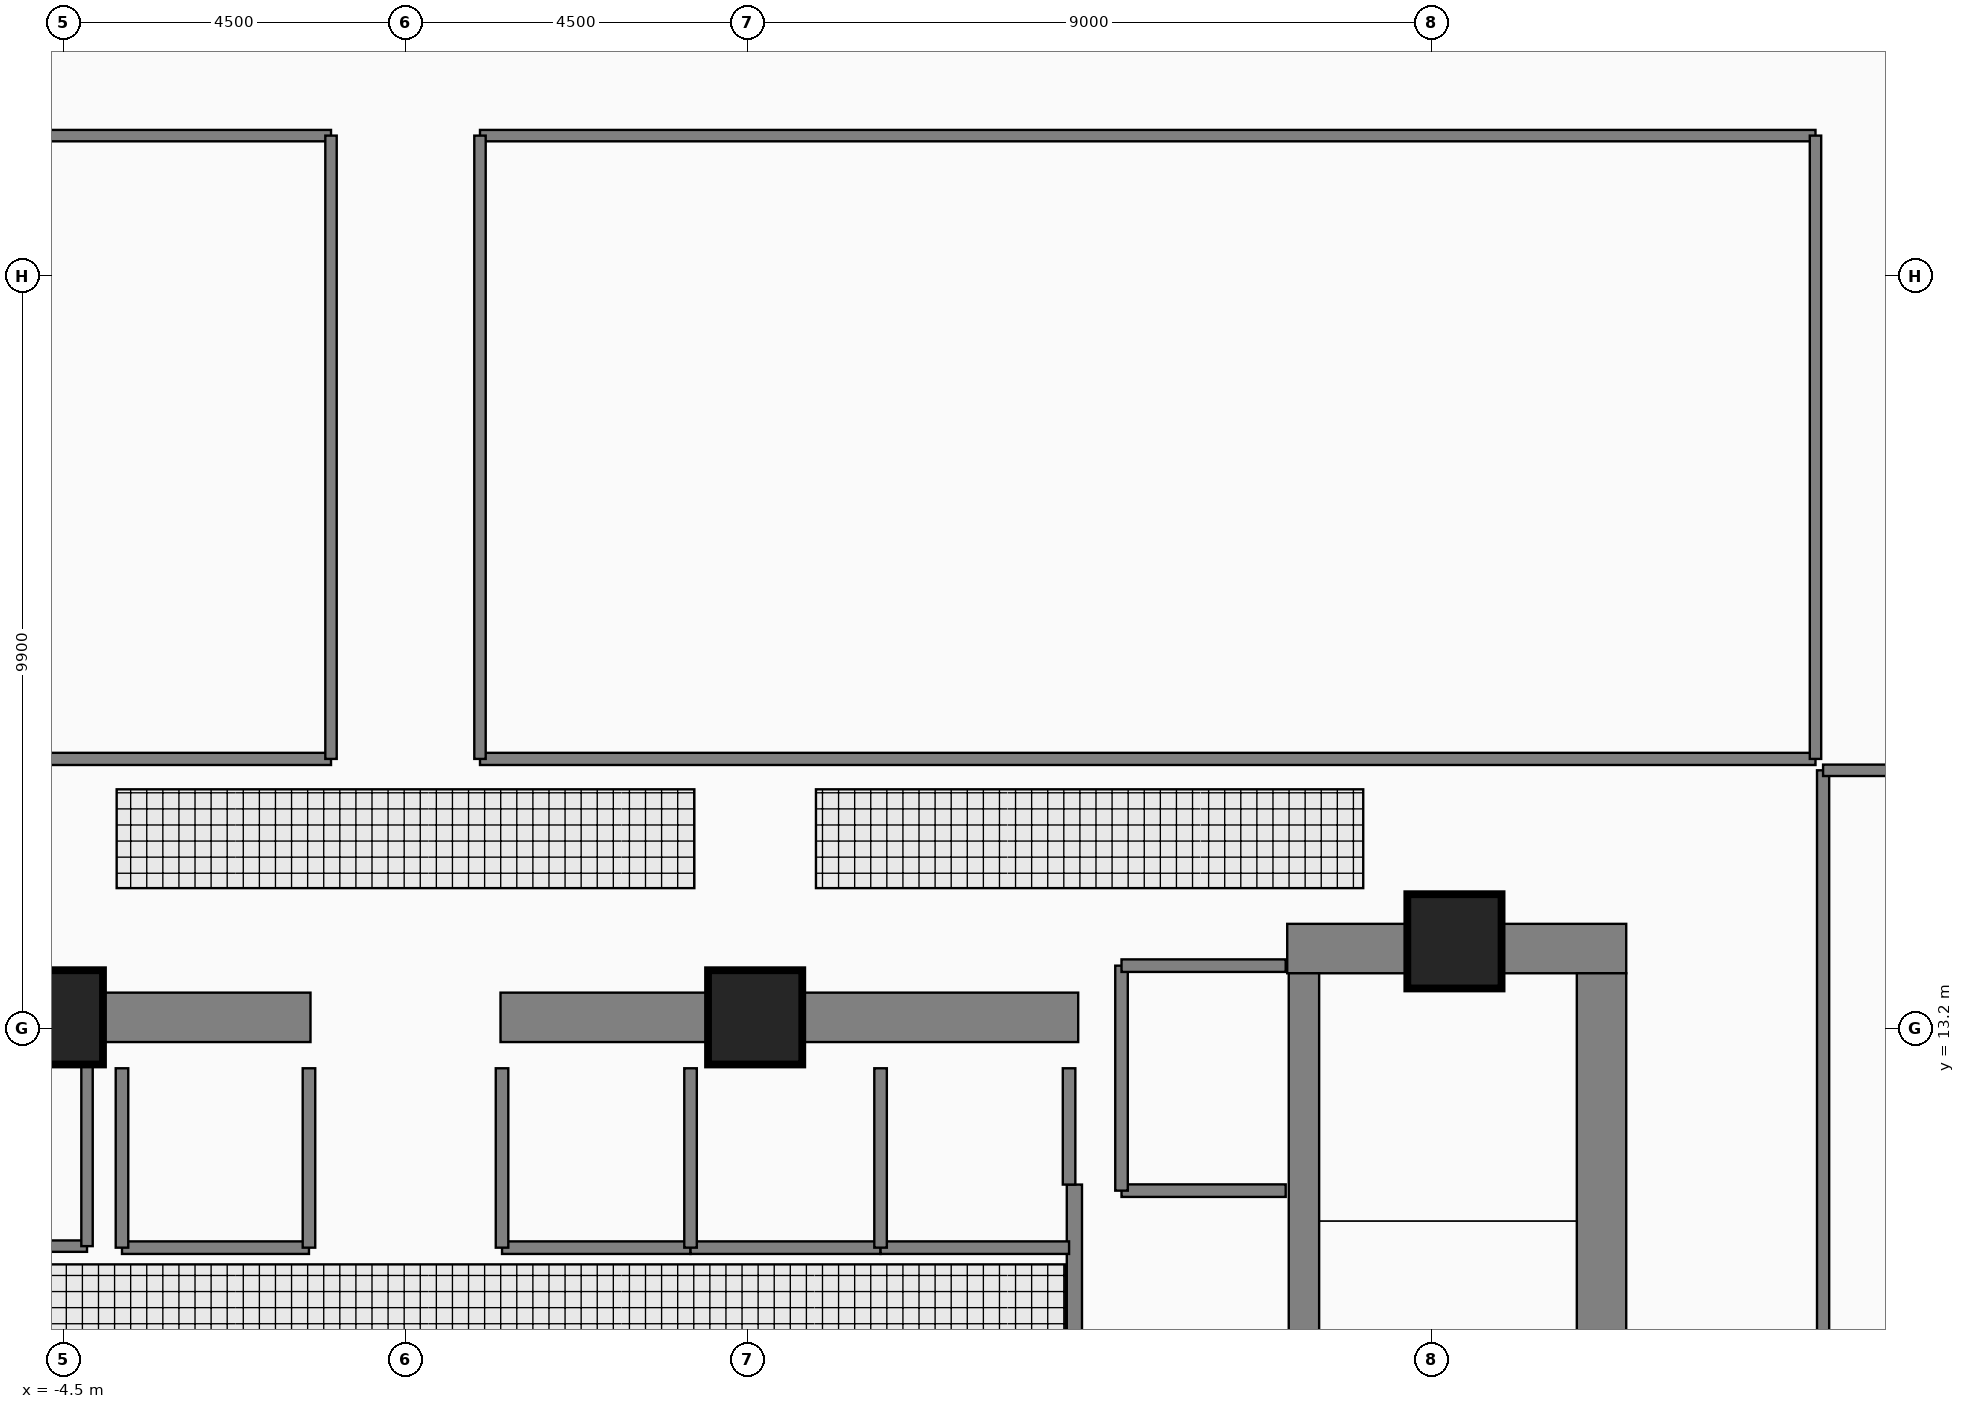
"""IFC4 building model, lengths in metres.
Left out: names, types, materials, properties, quantities, classifications, styles, units other than length and angle.
Written with IfcOpenShell. Run it as: python <this file> out.ifc"""

import sys

from ifc_helpers import new_model, si_unit, direction, frame, frame_2d, origin, origin_2d, place, context, subcontext, project, spatial, rectangle, extrude, element, fill, save


model = new_model("IFC4")
c1 = context("Model", 3, precision=1e-05, world=origin(), true_north=direction((0.0, 1.0)))
c2 = subcontext(c1, "Body", "Model", "MODEL_VIEW")
j1 = project(units=[si_unit("LENGTHUNIT", "METRE"), si_unit("PLANEANGLEUNIT", "RADIAN")], contexts=[c1])
p1 = place(None, origin())
s1 = spatial("IfcSite", under=j1, at=p1, CompositionType="ELEMENT")
p2 = place(p1, origin())
s2 = spatial("IfcBuilding", under=s1, at=p2, CompositionType="ELEMENT")
p3 = place(p2, frame((0.0, 0.0, 168.2)))
s3 = spatial("IfcBuildingStorey", under=s2, at=p3, CompositionType="ELEMENT", Elevation=168.2)
p4 = place(p3, frame((11.6, 14.255, 0.0), z_axis=(0.0, 0.0, 1.0), x_axis=(1.0, 0.0, 0.0)))
e1 = element("IfcWall", 1, at=p4, inside=s3, PredefinedType="SHEAR", context=c2, shape_type="SweptSolid", body=[
    extrude(rectangle(XDim=4.46, YDim=0.65, at=frame_2d((2.23, 0.0))), origin(), (0.0, 0.0, 1.0), 4.41),
])
p5 = place(p3, frame((15.735, 4.97, 0.0), z_axis=(0.0, 0.0, 1.0), x_axis=(0.0, 1.0, 0.0)))
e2 = element("IfcWall", 2, at=p5, inside=s3, PredefinedType="SHEAR", context=c2, shape_type="SweptSolid", body=[
    extrude(rectangle(XDim=8.96, YDim=0.65, at=frame_2d((4.48, 0.0))), origin(), (0.0, 0.0, 1.0), 4.41),
])
for number, where, z_axis, x_axis in (
    (3, (-8.85, 13.35, 0.0), (0.0, 0.0, 1.0), (1.0, 0.0, 0.0)),
    (4, (1.25, 13.35, 0.0), (0.0, 0.0, 1.0), (1.0, 0.0, 0.0)),
):
    element("IfcWall", number, at=place(p3, frame(where, z_axis=z_axis, x_axis=x_axis)), inside=s3, PredefinedType="SHEAR", context=c2, shape_type="SweptSolid", body=[
        extrude(rectangle(XDim=7.6, YDim=0.65, at=frame_2d((3.8, 0.0))), origin(), (0.0, 0.0, 1.0), 4.38),
    ])
p6 = place(p3, frame((11.82, 13.93, 0.0), z_axis=(0.0, 0.0, 1.0), x_axis=(0.0, -1.0, 0.0)))
e5 = element("IfcWall", 5, at=p6, inside=s3, PredefinedType="SHEAR", context=c2, shape_type="SweptSolid", body=[
    extrude(rectangle(XDim=8.96, YDim=0.4, at=frame_2d((4.48, 0.0))), origin(), (0.0, 0.0, 1.0), 4.41),
])
p7 = place(p6, frame((7.53, 0.0, 0.0)))
e6 = element("IfcOpeningElement", 6, at=p7, cuts=e5, PredefinedType="OPENING", context=c2, shape_type="SweptSolid", body=[
    extrude(rectangle(XDim=1.12, YDim=2.22, at=frame_2d((0.56, 1.11))), frame((0.0, 0.21, 0.0), z_axis=(0.0, -1.0, 0.0), x_axis=(1.0, 0.0, 0.0)), (0.0, 0.0, 1.0), 0.42),
])
for number, where, z_axis, x_axis in (
    (7, (-4.6, 13.35, 0.0), (0.0, 0.0, 1.0), (1.0, 0.0, 0.0)),
    (8, (4.6, 13.35, 0.0), (0.0, 0.0, 1.0), (1.0, 0.0, 0.0)),
    (9, (13.8, 14.35, 0.0), (0.0, 0.0, 1.0), (1.0, 0.0, 0.0)),
):
    element("IfcColumn", number, at=place(p3, frame(where, z_axis=z_axis, x_axis=x_axis)), inside=s3, PredefinedType="COLUMN", context=c2, shape_type="SweptSolid", body=[
        extrude(rectangle(XDim=1.2, YDim=1.2, at=origin_2d()), origin(), (0.0, 0.0, 1.0), 4.6),
    ])
p8 = place(p3, frame((8.8, 11.15, 0.0), z_axis=(0.0, 0.0, 1.0), x_axis=(0.0, -1.0, 0.0)))
e10 = element("IfcWall", 10, at=p8, inside=s3, PredefinedType="PARTITIONING", context=c2, shape_type="SweptSolid", body=[
    extrude(rectangle(XDim=6.1, YDim=0.2, at=frame_2d((3.05, 0.0))), origin(), (0.0, 0.0, 1.0), 4.38),
])
p9 = place(p8, frame((1.15, 0.0, 0.0)))
e11 = element("IfcOpeningElement", 11, at=p9, cuts=e10, PredefinedType="OPENING", context=c2, shape_type="SweptSolid", body=[
    extrude(rectangle(XDim=1.1, YDim=2.2, at=frame_2d((0.55, 1.1))), frame((0.0, 0.11, 0.0), z_axis=(0.0, -1.0, 0.0), x_axis=(1.0, 0.0, 0.0)), (0.0, 0.0, 1.0), 0.22),
])
p10 = place(p8, frame((4.75, 0.0, 0.0)))
e12 = element("IfcOpeningElement", 12, at=p10, cuts=e10, PredefinedType="OPENING", context=c2, shape_type="SweptSolid", body=[
    extrude(rectangle(XDim=1.1, YDim=2.2, at=frame_2d((0.55, 1.1))), frame((0.0, 0.11, 0.0), z_axis=(0.0, -1.0, 0.0), x_axis=(1.0, 0.0, 0.0)), (0.0, 0.0, 1.0), 0.22),
])
p11 = place(p3, frame((9.42, 11.07, 0.0), z_axis=(0.0, 0.0, 1.0), x_axis=(1.0, 0.0, 0.0)))
e13 = element("IfcWall", 13, at=p11, inside=s3, PredefinedType="PARTITIONING", context=c2, shape_type="SweptSolid", body=[
    extrude(rectangle(XDim=2.16, YDim=0.165, at=frame_2d((1.08, 0.0))), origin(), (0.0, 0.0, 1.0), 4.38),
])
p12 = place(p11, frame((0.53, 0.0, 0.0)))
e14 = element("IfcOpeningElement", 14, at=p12, cuts=e13, PredefinedType="OPENING", context=c2, shape_type="SweptSolid", body=[
    extrude(rectangle(XDim=1.15, YDim=2.25, at=frame_2d((0.575, 1.125))), frame((0.0, 0.093, 0.0), z_axis=(0.0, -1.0, 0.0), x_axis=(1.0, 0.0, 0.0)), (0.0, 0.0, 1.0), 0.185),
])
p13 = place(p3, frame((-3.73, 10.32, 0.0), z_axis=(0.0, 0.0, 1.0), x_axis=(1.0, 0.0, 0.0)))
e15 = element("IfcWall", 15, at=p13, inside=s3, PredefinedType="PARTITIONING", context=c2, shape_type="SweptSolid", body=[
    extrude(rectangle(XDim=2.46, YDim=0.165, at=frame_2d((1.23, 0.0))), origin(), (0.0, 0.0, 1.0), 4.38),
])
p14 = place(p13, frame((0.68, 0.0, 0.0)))
e16 = element("IfcOpeningElement", 16, at=p14, cuts=e15, PredefinedType="OPENING", context=c2, shape_type="SweptSolid", body=[
    extrude(rectangle(XDim=1.1, YDim=2.25, at=frame_2d((0.55, 1.125))), frame((0.0, 0.093, 0.0), z_axis=(0.0, -1.0, 0.0), x_axis=(1.0, 0.0, 0.0)), (0.0, 0.0, 1.0), 0.185),
])
p15 = place(p3, frame((1.27, 10.32, 0.0), z_axis=(0.0, 0.0, 1.0), x_axis=(1.0, 0.0, 0.0)))
e17 = element("IfcWall", 17, at=p15, inside=s3, PredefinedType="PARTITIONING", context=c2, shape_type="SweptSolid", body=[
    extrude(rectangle(XDim=2.48, YDim=0.165, at=frame_2d((1.24, 0.0))), origin(), (0.0, 0.0, 1.0), 4.38),
])
p16 = place(p15, frame((0.69, 0.0, 0.0)))
e18 = element("IfcOpeningElement", 18, at=p16, cuts=e17, PredefinedType="OPENING", context=c2, shape_type="SweptSolid", body=[
    extrude(rectangle(XDim=1.1, YDim=2.25, at=frame_2d((0.55, 1.125))), frame((0.0, 0.093, 0.0), z_axis=(0.0, -1.0, 0.0), x_axis=(1.0, 0.0, 0.0)), (0.0, 0.0, 1.0), 0.185),
])
p17 = place(p3, frame((3.75, 10.32, 0.0), z_axis=(0.0, 0.0, 1.0), x_axis=(1.0, 0.0, 0.0)))
e19 = element("IfcWall", 19, at=p17, inside=s3, PredefinedType="PARTITIONING", context=c2, shape_type="SweptSolid", body=[
    extrude(rectangle(XDim=2.5, YDim=0.165, at=frame_2d((1.25, 0.0))), origin(), (0.0, 0.0, 1.0), 4.38),
])
p18 = place(p17, frame((0.7, 0.0, 0.0)))
e20 = element("IfcOpeningElement", 20, at=p18, cuts=e19, PredefinedType="OPENING", context=c2, shape_type="SweptSolid", body=[
    extrude(rectangle(XDim=1.1, YDim=2.25, at=frame_2d((0.55, 1.125))), frame((0.0, 0.093, 0.0), z_axis=(0.0, -1.0, 0.0), x_axis=(1.0, 0.0, 0.0)), (0.0, 0.0, 1.0), 0.185),
])
p19 = place(p3, frame((6.25, 10.32, 0.0), z_axis=(0.0, 0.0, 1.0), x_axis=(1.0, 0.0, 0.0)))
e21 = element("IfcWall", 21, at=p19, inside=s3, PredefinedType="PARTITIONING", context=c2, shape_type="SweptSolid", body=[
    extrude(rectangle(XDim=2.48, YDim=0.165, at=frame_2d((1.24, 0.0))), origin(), (0.0, 0.0, 1.0), 4.38),
])
p20 = place(p19, frame((0.69, 0.0, 0.0)))
e22 = element("IfcOpeningElement", 22, at=p20, cuts=e21, PredefinedType="OPENING", context=c2, shape_type="SweptSolid", body=[
    extrude(rectangle(XDim=1.1, YDim=2.25, at=frame_2d((0.55, 1.125))), frame((0.0, 0.093, 0.0), z_axis=(0.0, -1.0, 0.0), x_axis=(1.0, 0.0, 0.0)), (0.0, 0.0, 1.0), 0.185),
])
p21 = place(p3, frame((-8.71, 10.34, 0.0), z_axis=(0.0, 0.0, 1.0), x_axis=(1.0, 0.0, 0.0)))
e23 = element("IfcWall", 23, at=p21, inside=s3, PredefinedType="PARTITIONING", context=c2, shape_type="SweptSolid", body=[
    extrude(rectangle(XDim=4.52, YDim=0.15, at=frame_2d((2.26, 0.0))), origin(), (0.0, 0.0, 1.0), 4.38),
])
p22 = place(p21, frame((1.81, 0.0, 0.0)))
e24 = element("IfcOpeningElement", 24, at=p22, cuts=e23, PredefinedType="OPENING", context=c2, shape_type="SweptSolid", body=[
    extrude(rectangle(XDim=0.9, YDim=2.15, at=frame_2d((0.45, 1.075))), frame((0.0, 0.085, 0.0), z_axis=(0.0, -1.0, 0.0), x_axis=(1.0, 0.0, 0.0)), (0.0, 0.0, 1.0), 0.17),
])
p23 = place(p3, frame((-18.55, 16.75, 0.0), z_axis=(0.0, 0.0, 1.0), x_axis=(1.0, 0.0, 0.0)))
e25 = element("IfcWall", 25, at=p23, inside=s3, PredefinedType="PARTITIONING", context=c2, shape_type="SweptSolid", body=[
    extrude(rectangle(XDim=17.57, YDim=0.16, at=frame_2d((8.785, 0.0))), origin(), (0.0, 0.0, 1.0), 3.974),
])
p24 = place(p23, frame((11.16, 0.0, 0.0)))
e26 = element("IfcOpeningElement", 26, at=p24, cuts=e25, PredefinedType="OPENING", context=c2, shape_type="SweptSolid", body=[
    extrude(rectangle(XDim=1.08, YDim=2.18, at=frame_2d((0.54, 1.09))), frame((0.0, 0.09, 0.0), z_axis=(0.0, -1.0, 0.0), x_axis=(1.0, 0.0, 0.0)), (0.0, 0.0, 1.0), 0.18),
])
p25 = place(p3, frame((0.98, 16.75, 0.0), z_axis=(0.0, 0.0, 1.0), x_axis=(1.0, 0.0, 0.0)))
e27 = element("IfcWall", 27, at=p25, inside=s3, PredefinedType="PARTITIONING", context=c2, shape_type="SweptSolid", body=[
    extrude(rectangle(XDim=17.57, YDim=0.16, at=frame_2d((8.785, 0.0))), origin(), (0.0, 0.0, 1.0), 3.974),
])
p26 = place(p25, frame((10.03, 0.0, 0.0)))
e28 = element("IfcOpeningElement", 28, at=p26, cuts=e27, PredefinedType="OPENING", context=c2, shape_type="SweptSolid", body=[
    extrude(rectangle(XDim=1.08, YDim=2.18, at=frame_2d((0.54, 1.09))), frame((0.0, 0.09, 0.0), z_axis=(0.0, -1.0, 0.0), x_axis=(1.0, 0.0, 0.0)), (0.0, 0.0, 1.0), 0.18),
])
p27 = place(p3, frame((18.65, 1.55, 0.0), z_axis=(0.0, 0.0, 1.0), x_axis=(0.0, 1.0, 0.0)))
e29 = element("IfcWall", 29, at=p27, inside=s3, PredefinedType="PARTITIONING", context=c2, shape_type="SweptSolid", body=[
    extrude(rectangle(XDim=15.05, YDim=0.16, at=frame_2d((7.525, 0.0))), origin(), (0.0, 0.0, 1.0), 4.38),
])
p28 = place(p27, frame((6.985, 0.0, 0.0)))
e30 = element("IfcOpeningElement", 30, at=p28, cuts=e29, PredefinedType="OPENING", context=c2, shape_type="SweptSolid", body=[
    extrude(rectangle(XDim=1.08, YDim=2.18, at=frame_2d((0.54, 1.09))), frame((0.0, 0.09, 0.0), z_axis=(0.0, -1.0, 0.0), x_axis=(1.0, 0.0, 0.0)), (0.0, 0.0, 1.0), 0.18),
])
p29 = place(p3, frame((9.42, 11.07, 0.0), z_axis=(0.0, 0.0, 1.0), x_axis=(0.0, 1.0, 0.0)))
e31 = element("IfcWall", 31, at=p29, inside=s3, PredefinedType="PARTITIONING", context=c2, shape_type="SweptSolid", body=[
    extrude(rectangle(XDim=2.96, YDim=0.165, at=frame_2d((1.48, 0.0))), origin(), (0.0, 0.0, 1.0), 4.38),
])
p30 = place(p3, frame((9.42, 14.03, 0.0), z_axis=(0.0, 0.0, 1.0), x_axis=(1.0, 0.0, 0.0)))
e32 = element("IfcWall", 32, at=p30, inside=s3, PredefinedType="PARTITIONING", context=c2, shape_type="SweptSolid", body=[
    extrude(rectangle(XDim=2.16, YDim=0.165, at=frame_2d((1.08, 0.0))), origin(), (0.0, 0.0, 1.0), 4.38),
])
for number, where, z_axis, x_axis in (
    (33, (-3.73, 10.32, 0.0), (0.0, 0.0, 1.0), (0.0, 1.0, 0.0)),
    (34, (-1.27, 10.32, 0.0), (0.0, 0.0, 1.0), (0.0, 1.0, 0.0)),
    (35, (1.27, 10.32, 0.0), (0.0, 0.0, 1.0), (0.0, 1.0, 0.0)),
    (36, (3.75, 10.32, 0.0), (0.0, 0.0, 1.0), (0.0, 1.0, 0.0)),
    (37, (6.25, 10.32, 0.0), (0.0, 0.0, 1.0), (0.0, 1.0, 0.0)),
):
    element("IfcWall", number, at=place(p3, frame(where, z_axis=z_axis, x_axis=x_axis)), inside=s3, PredefinedType="PARTITIONING", context=c2, shape_type="SweptSolid", body=[
        extrude(rectangle(XDim=2.36, YDim=0.165, at=frame_2d((1.18, 0.0))), origin(), (0.0, 0.0, 1.0), 4.38),
    ])
p31 = place(p3, frame((8.73, 11.15, 0.0), z_axis=(0.0, 0.0, 1.0), x_axis=(0.0, 1.0, 0.0)))
e38 = element("IfcWall", 38, at=p31, inside=s3, PredefinedType="PARTITIONING", context=c2, shape_type="SweptSolid", body=[
    extrude(rectangle(XDim=1.53, YDim=0.165, at=frame_2d((0.765, 0.0))), origin(), (0.0, 0.0, 1.0), 4.38),
])
p32 = place(p3, frame((-4.19, 10.34, 0.0), z_axis=(0.0, 0.0, 1.0), x_axis=(0.0, 1.0, 0.0)))
e39 = element("IfcWall", 39, at=p32, inside=s3, PredefinedType="PARTITIONING", context=c2, shape_type="SweptSolid", body=[
    extrude(rectangle(XDim=2.52, YDim=0.15, at=frame_2d((1.26, 0.0))), origin(), (0.0, 0.0, 1.0), 4.38),
])
p33 = place(p3, frame((-18.55, 24.95, 0.0), z_axis=(0.0, 0.0, 1.0), x_axis=(1.0, 0.0, 0.0)))
e40 = element("IfcWall", 40, at=p33, inside=s3, PredefinedType="PARTITIONING", context=c2, shape_type="SweptSolid", body=[
    extrude(rectangle(XDim=17.57, YDim=0.15, at=frame_2d((8.785, 0.0))), origin(), (0.0, 0.0, 1.0), 3.974),
])
p34 = place(p3, frame((-0.98, 16.75, 0.0), z_axis=(0.0, 0.0, 1.0), x_axis=(0.0, 1.0, 0.0)))
e41 = element("IfcWall", 41, at=p34, inside=s3, PredefinedType="PARTITIONING", context=c2, shape_type="SweptSolid", body=[
    extrude(rectangle(XDim=8.2, YDim=0.15, at=frame_2d((4.1, 0.0))), origin(), (0.0, 0.0, 1.0), 4.38),
])
p35 = place(p3, frame((0.98, 24.95, 0.0), z_axis=(0.0, 0.0, 1.0), x_axis=(1.0, 0.0, 0.0)))
e42 = element("IfcWall", 42, at=p35, inside=s3, PredefinedType="PARTITIONING", context=c2, shape_type="SweptSolid", body=[
    extrude(rectangle(XDim=17.57, YDim=0.15, at=frame_2d((8.785, 0.0))), origin(), (0.0, 0.0, 1.0), 3.974),
])
for number, where, z_axis, x_axis in (
    (43, (0.98, 16.75, 0.0), (0.0, 0.0, 1.0), (0.0, 1.0, 0.0)),
    (44, (18.55, 16.75, 0.0), (0.0, 0.0, 1.0), (0.0, 1.0, 0.0)),
):
    element("IfcWall", number, at=place(p3, frame(where, z_axis=z_axis, x_axis=x_axis)), inside=s3, PredefinedType="PARTITIONING", context=c2, shape_type="SweptSolid", body=[
        extrude(rectangle(XDim=8.2, YDim=0.15, at=frame_2d((4.1, 0.0))), origin(), (0.0, 0.0, 1.0), 4.38),
    ])
p36 = place(p3, frame((18.65, 16.6, 0.0), z_axis=(0.0, 0.0, 1.0), x_axis=(1.0, 0.0, 0.0)))
e45 = element("IfcWall", 45, at=p36, inside=s3, PredefinedType="PARTITIONING", context=c2, shape_type="SweptSolid", body=[
    extrude(rectangle(XDim=4.04, YDim=0.15, at=frame_2d((2.02, 0.0))), origin(), (0.0, 0.0, 1.0), 4.38),
])
p37 = place(p9, origin())
e46 = element("IfcDoor", 46, at=p37, inside=s3, OperationType="SINGLE_SWING_LEFT", PredefinedType="DOOR", context=c2, shape_type="SweptSolid", body=[
    extrude(rectangle(XDim=1.1, YDim=2.2, at=frame_2d((0.55, 1.1))), frame((0.0, 0.025, 0.0), z_axis=(0.0, -1.0, 0.0), x_axis=(1.0, 0.0, 0.0)), (0.0, 0.0, 1.0), 0.05),
])
fill(e11, e46)
p38 = place(p12, origin())
e47 = element("IfcDoor", 47, at=p38, inside=s3, OperationType="SLIDING_TO_LEFT", PredefinedType="DOOR", context=c2, shape_type="SweptSolid", body=[
    extrude(rectangle(XDim=1.15, YDim=2.25, at=frame_2d((0.575, 1.125))), frame((0.0, 0.025, 0.0), z_axis=(0.0, -1.0, 0.0), x_axis=(1.0, 0.0, 0.0)), (0.0, 0.0, 1.0), 0.05),
])
fill(e14, e47)
p39 = place(p14, origin())
e48 = element("IfcDoor", 48, at=p39, inside=s3, OperationType="SLIDING_TO_LEFT", PredefinedType="DOOR", context=c2, shape_type="SweptSolid", body=[
    extrude(rectangle(XDim=1.1, YDim=2.25, at=frame_2d((0.55, 1.125))), frame((0.0, 0.025, 0.0), z_axis=(0.0, -1.0, 0.0), x_axis=(1.0, 0.0, 0.0)), (0.0, 0.0, 1.0), 0.05),
])
fill(e16, e48)
p40 = place(p16, origin())
e49 = element("IfcDoor", 49, at=p40, inside=s3, OperationType="SLIDING_TO_LEFT", PredefinedType="DOOR", context=c2, shape_type="SweptSolid", body=[
    extrude(rectangle(XDim=1.1, YDim=2.25, at=frame_2d((0.55, 1.125))), frame((0.0, 0.025, 0.0), z_axis=(0.0, -1.0, 0.0), x_axis=(1.0, 0.0, 0.0)), (0.0, 0.0, 1.0), 0.05),
])
fill(e18, e49)
p41 = place(p18, origin())
e50 = element("IfcDoor", 50, at=p41, inside=s3, OperationType="SLIDING_TO_LEFT", PredefinedType="DOOR", context=c2, shape_type="SweptSolid", body=[
    extrude(rectangle(XDim=1.1, YDim=2.25, at=frame_2d((0.55, 1.125))), frame((0.0, 0.025, 0.0), z_axis=(0.0, -1.0, 0.0), x_axis=(1.0, 0.0, 0.0)), (0.0, 0.0, 1.0), 0.05),
])
fill(e20, e50)
p42 = place(p20, origin())
e51 = element("IfcDoor", 51, at=p42, inside=s3, OperationType="SLIDING_TO_LEFT", PredefinedType="DOOR", context=c2, shape_type="SweptSolid", body=[
    extrude(rectangle(XDim=1.1, YDim=2.25, at=frame_2d((0.55, 1.125))), frame((0.0, 0.025, 0.0), z_axis=(0.0, -1.0, 0.0), x_axis=(1.0, 0.0, 0.0)), (0.0, 0.0, 1.0), 0.05),
])
fill(e22, e51)
p43 = place(p26, origin())
e52 = element("IfcDoor", 52, at=p43, inside=s3, OperationType="SINGLE_SWING_RIGHT", PredefinedType="DOOR", context=c2, shape_type="SweptSolid", body=[
    extrude(rectangle(XDim=1.08, YDim=2.18, at=frame_2d((0.54, 1.09))), frame((0.0, 0.025, 0.0), z_axis=(0.0, -1.0, 0.0), x_axis=(1.0, 0.0, 0.0)), (0.0, 0.0, 1.0), 0.05),
])
fill(e28, e52)
p44 = place(p28, origin())
e53 = element("IfcDoor", 53, at=p44, inside=s3, OperationType="SINGLE_SWING_RIGHT", PredefinedType="DOOR", context=c2, shape_type="SweptSolid", body=[
    extrude(rectangle(XDim=1.08, YDim=2.18, at=frame_2d((0.54, 1.09))), frame((0.0, 0.025, 0.0), z_axis=(0.0, -1.0, 0.0), x_axis=(1.0, 0.0, 0.0)), (0.0, 0.0, 1.0), 0.05),
])
fill(e30, e53)
save(model, sys.argv[1])
